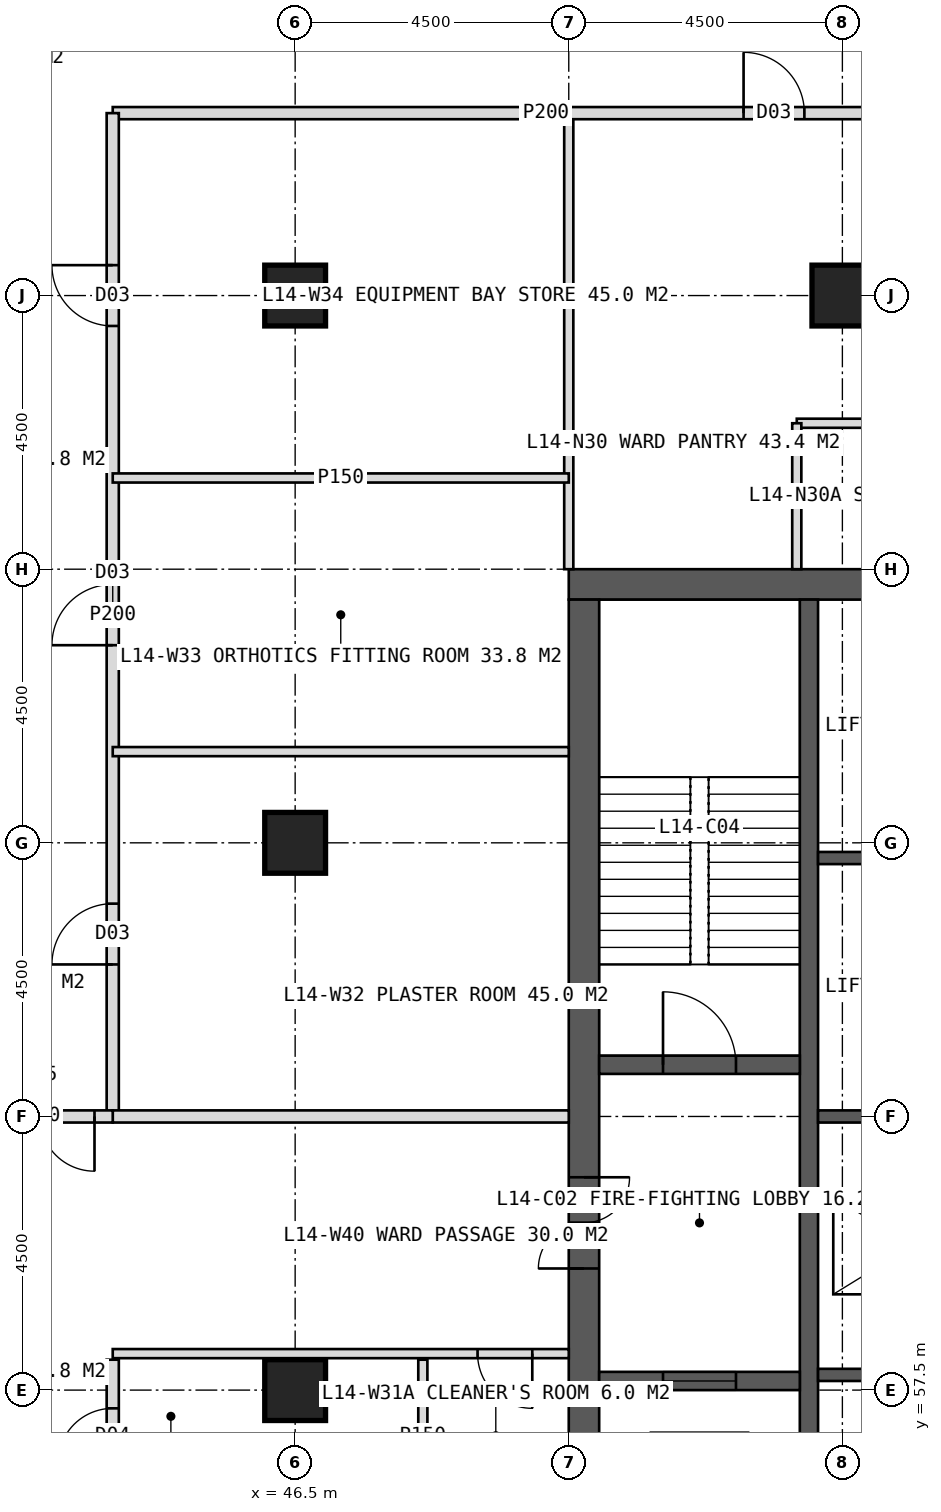
"""IFC4 building model, lengths in metres.
Left out: names, types, materials, properties, quantities, classifications, styles, units other than length and angle.
Written with IfcOpenShell. Run it as: python <this file> out.ifc"""

import sys

from ifc_helpers import new_model, si_unit, direction, frame, frame_2d, origin, origin_2d, place, context, subcontext, project, spatial, rectangle, hollow_rectangle, extrude, element, fill, save


model = new_model("IFC4")
c1 = context("Model", 3, precision=1e-05, world=origin(), true_north=direction((0.0, 1.0)))
c2 = subcontext(c1, "Body", "Model", "MODEL_VIEW")
j1 = project(units=[si_unit("LENGTHUNIT", "METRE"), si_unit("PLANEANGLEUNIT", "RADIAN")], contexts=[c1])
p1 = place(None, origin())
s1 = spatial("IfcSite", under=j1, at=p1, CompositionType="ELEMENT")
p2 = place(p1, origin())
s2 = spatial("IfcBuilding", under=s1, at=p2, CompositionType="ELEMENT")
p3 = place(p2, frame((0.0, 0.0, 63.0)))
s3 = spatial("IfcBuildingStorey", under=s2, at=p3, CompositionType="ELEMENT", Elevation=63.0)
p4 = place(p3, frame((51.0, 70.75, 0.0), z_axis=(0.0, 0.0, 1.0), x_axis=(1.0, 0.0, 0.0)))
e1 = element("IfcWall", 1, at=p4, inside=s3, PredefinedType="SHEAR", context=c2, shape_type="SweptSolid", body=[
    extrude(rectangle(XDim=18.0, YDim=0.5, at=frame_2d((9.0, 0.0))), origin(), (0.0, 0.0, 1.0), 4.0),
])
p5 = place(p4, frame((8.1, 0.0, 0.0)))
e2 = element("IfcOpeningElement", 2, at=p5, cuts=e1, PredefinedType="OPENING", context=c2, shape_type="SweptSolid", body=[
    extrude(rectangle(XDim=1.8, YDim=2.2, at=frame_2d((0.9, 1.1))), frame((0.0, 0.26, 0.0), z_axis=(0.0, -1.0, 0.0), x_axis=(1.0, 0.0, 0.0)), (0.0, 0.0, 1.0), 0.52),
])
p6 = place(p3, frame((51.25, 53.5, 0.0), z_axis=(0.0, 0.0, 1.0), x_axis=(0.0, 1.0, 0.0)))
e3 = element("IfcWall", 3, at=p6, inside=s3, PredefinedType="SHEAR", context=c2, shape_type="SweptSolid", body=[
    extrude(rectangle(XDim=17.0, YDim=0.5, at=frame_2d((8.5, 0.0))), origin(), (0.0, 0.0, 1.0), 4.0),
])
p7 = place(p6, frame((6.0, 0.0, 0.0)))
e4 = element("IfcOpeningElement", 4, at=p7, cuts=e3, PredefinedType="OPENING", context=c2, shape_type="SweptSolid", body=[
    extrude(rectangle(XDim=1.5, YDim=2.2, at=frame_2d((0.75, 1.1))), frame((0.0, 0.26, 0.0), z_axis=(0.0, -1.0, 0.0), x_axis=(1.0, 0.0, 0.0)), (0.0, 0.0, 1.0), 0.52),
])
p8 = place(p3, frame((54.95, 53.5, 0.0), z_axis=(0.0, 0.0, 1.0), x_axis=(0.0, 1.0, 0.0)))
e5 = element("IfcWall", 5, at=p8, inside=s3, PredefinedType="SHEAR", context=c2, shape_type="SweptSolid", body=[
    extrude(rectangle(XDim=17.0, YDim=0.3, at=frame_2d((8.5, 0.0))), origin(), (0.0, 0.0, 1.0), 4.0),
])
for number, where, z_axis, x_axis in (
    (6, (55.1, 57.75, 0.0), (0.0, 0.0, 1.0), (1.0, 0.0, 0.0)),
    (7, (55.1, 62.0, 0.0), (0.0, 0.0, 1.0), (1.0, 0.0, 0.0)),
    (8, (55.1, 66.25, 0.0), (0.0, 0.0, 1.0), (1.0, 0.0, 0.0)),
):
    element("IfcWall", number, at=place(p3, frame(where, z_axis=z_axis, x_axis=x_axis)), inside=s3, PredefinedType="SHEAR", context=c2, shape_type="SweptSolid", body=[
        extrude(rectangle(XDim=3.05, YDim=0.2, at=frame_2d((1.525, 0.0))), origin(), (0.0, 0.0, 1.0), 4.0),
    ])
p9 = place(p3, frame((51.5, 62.85, 0.0), z_axis=(0.0, 0.0, 1.0), x_axis=(1.0, 0.0, 0.0)))
e9 = element("IfcWall", 9, at=p9, inside=s3, PredefinedType="SHEAR", context=c2, shape_type="SweptSolid", body=[
    extrude(rectangle(XDim=3.3, YDim=0.3, at=frame_2d((1.65, 0.0))), origin(), (0.0, 0.0, 1.0), 4.0),
])
p10 = place(p9, frame((1.05, 0.0, 0.0)))
e10 = element("IfcOpeningElement", 10, at=p10, cuts=e9, PredefinedType="OPENING", context=c2, shape_type="SweptSolid", body=[
    extrude(rectangle(XDim=1.2, YDim=2.1, at=frame_2d((0.6, 1.05))), frame((0.0, 0.16, 0.0), z_axis=(0.0, -1.0, 0.0), x_axis=(1.0, 0.0, 0.0)), (0.0, 0.0, 1.0), 0.32),
])
p11 = place(p3, frame((51.5, 57.65, 0.0), z_axis=(0.0, 0.0, 1.0), x_axis=(1.0, 0.0, 0.0)))
e11 = element("IfcWall", 11, at=p11, inside=s3, PredefinedType="SHEAR", context=c2, shape_type="SweptSolid", body=[
    extrude(rectangle(XDim=3.3, YDim=0.3, at=frame_2d((1.65, 0.0))), origin(), (0.0, 0.0, 1.0), 4.0),
])
p12 = place(p11, frame((1.05, 0.0, 0.0)))
e12 = element("IfcOpeningElement", 12, at=p12, cuts=e11, PredefinedType="OPENING", context=c2, shape_type="SweptSolid", body=[
    extrude(rectangle(XDim=1.2, YDim=2.2, at=frame_2d((0.6, 1.1))), frame((0.0, 0.16, 0.0), z_axis=(0.0, -1.0, 0.0), x_axis=(1.0, 0.0, 0.0)), (0.0, 0.0, 1.0), 0.32),
])
for number, where, z_axis, x_axis in (
    (13, (46.5, 75.5, 0.0), (0.0, 0.0, 1.0), (1.0, 0.0, 0.0)),
    (14, (55.5, 75.5, 0.0), (0.0, 0.0, 1.0), (1.0, 0.0, 0.0)),
    (15, (46.5, 57.5, 0.0), (0.0, 0.0, 1.0), (1.0, 0.0, 0.0)),
    (16, (46.5, 66.5, 0.0), (0.0, 0.0, 1.0), (1.0, 0.0, 0.0)),
):
    element("IfcColumn", number, at=place(p3, frame(where, z_axis=z_axis, x_axis=x_axis)), inside=s3, PredefinedType="COLUMN", context=c2, shape_type="SweptSolid", body=[
        extrude(hollow_rectangle(XDim=1.0, YDim=1.0, WallThickness=0.1, at=origin_2d()), origin(), (0.0, 0.0, 1.0), 4.0),
    ])
p13 = place(p3, frame((51.0, 71.0, 0.0), z_axis=(0.0, 0.0, 1.0), x_axis=(0.0, 1.0, 0.0)))
e17 = element("IfcWall", 17, at=p13, inside=s3, PredefinedType="PARTITIONING", context=c2, shape_type="SweptSolid", body=[
    extrude(rectangle(XDim=7.5, YDim=0.15, at=frame_2d((3.75, 0.0))), origin(), (0.0, 0.0, 1.0), 3.75),
])
p14 = place(p3, frame((43.5, 78.5, 0.0), z_axis=(0.0, 0.0, 1.0), x_axis=(1.0, 0.0, 0.0)))
e18 = element("IfcWall", 18, at=p14, inside=s3, PredefinedType="PARTITIONING", context=c2, shape_type="SweptSolid", body=[
    extrude(rectangle(XDim=14.25, YDim=0.2, at=frame_2d((7.125, 0.0))), origin(), (0.0, 0.0, 1.0), 3.75),
])
p15 = place(p14, frame((10.375, 0.0, 0.0)))
e19 = element("IfcOpeningElement", 19, at=p15, cuts=e18, PredefinedType="OPENING", context=c2, shape_type="SweptSolid", body=[
    extrude(rectangle(XDim=1.0, YDim=2.1, at=frame_2d((0.5, 1.05))), frame((0.0, 0.11, 0.0), z_axis=(0.0, -1.0, 0.0), x_axis=(1.0, 0.0, 0.0)), (0.0, 0.0, 1.0), 0.22),
])
p16 = place(p3, frame((54.75, 73.4, 0.0), z_axis=(0.0, 0.0, 1.0), x_axis=(1.0, 0.0, 0.0)))
e20 = element("IfcWall", 20, at=p16, inside=s3, PredefinedType="PARTITIONING", context=c2, shape_type="SweptSolid", body=[
    extrude(rectangle(XDim=3.0, YDim=0.15, at=frame_2d((1.5, 0.0))), origin(), (0.0, 0.0, 1.0), 3.75),
])
p17 = place(p3, frame((54.75, 71.0, 0.0), z_axis=(0.0, 0.0, 1.0), x_axis=(0.0, 1.0, 0.0)))
e21 = element("IfcWall", 21, at=p17, inside=s3, PredefinedType="PARTITIONING", context=c2, shape_type="SweptSolid", body=[
    extrude(rectangle(XDim=2.4, YDim=0.15, at=frame_2d((1.2, 0.0))), origin(), (0.0, 0.0, 1.0), 3.75),
])
p18 = place(p3, frame((43.5, 45.5, 0.0), z_axis=(0.0, 0.0, 1.0), x_axis=(0.0, 1.0, 0.0)))
e22 = element("IfcWall", 22, at=p18, inside=s3, PredefinedType="PARTITIONING", context=c2, shape_type="SweptSolid", body=[
    extrude(rectangle(XDim=12.5, YDim=0.2, at=frame_2d((6.25, 0.0))), origin(), (0.0, 0.0, 1.0), 3.75),
])
p19 = place(p18, frame((8.3, 0.0, 0.0)))
e23 = element("IfcOpeningElement", 23, at=p19, cuts=e22, PredefinedType="OPENING", context=c2, shape_type="SweptSolid", body=[
    extrude(rectangle(XDim=0.9, YDim=2.1, at=frame_2d((0.45, 1.05))), frame((0.0, 0.11, 0.0), z_axis=(0.0, -1.0, 0.0), x_axis=(1.0, 0.0, 0.0)), (0.0, 0.0, 1.0), 0.22),
])
p20 = place(p18, frame((10.8, 0.0, 0.0)))
e24 = element("IfcOpeningElement", 24, at=p20, cuts=e22, PredefinedType="OPENING", context=c2, shape_type="SweptSolid", body=[
    extrude(rectangle(XDim=0.9, YDim=2.1, at=frame_2d((0.45, 1.05))), frame((0.0, 0.11, 0.0), z_axis=(0.0, -1.0, 0.0), x_axis=(1.0, 0.0, 0.0)), (0.0, 0.0, 1.0), 0.22),
])
p21 = place(p3, frame((43.5, 62.0, 0.0), z_axis=(0.0, 0.0, 1.0), x_axis=(0.0, 1.0, 0.0)))
e25 = element("IfcWall", 25, at=p21, inside=s3, PredefinedType="PARTITIONING", context=c2, shape_type="SweptSolid", body=[
    extrude(rectangle(XDim=16.5, YDim=0.2, at=frame_2d((8.25, 0.0))), origin(), (0.0, 0.0, 1.0), 3.75),
])
p22 = place(p21, frame((2.5, 0.0, 0.0)))
e26 = element("IfcOpeningElement", 26, at=p22, cuts=e25, PredefinedType="OPENING", context=c2, shape_type="SweptSolid", body=[
    extrude(rectangle(XDim=1.0, YDim=2.1, at=frame_2d((0.5, 1.05))), frame((0.0, 0.11, 0.0), z_axis=(0.0, -1.0, 0.0), x_axis=(1.0, 0.0, 0.0)), (0.0, 0.0, 1.0), 0.22),
])
p23 = place(p21, frame((7.75, 0.0, 0.0)))
e27 = element("IfcOpeningElement", 27, at=p23, cuts=e25, PredefinedType="OPENING", context=c2, shape_type="SweptSolid", body=[
    extrude(rectangle(XDim=1.0, YDim=2.1, at=frame_2d((0.5, 1.05))), frame((0.0, 0.11, 0.0), z_axis=(0.0, -1.0, 0.0), x_axis=(1.0, 0.0, 0.0)), (0.0, 0.0, 1.0), 0.22),
])
p24 = place(p21, frame((13.0, 0.0, 0.0)))
e28 = element("IfcOpeningElement", 28, at=p24, cuts=e25, PredefinedType="OPENING", context=c2, shape_type="SweptSolid", body=[
    extrude(rectangle(XDim=1.0, YDim=2.1, at=frame_2d((0.5, 1.05))), frame((0.0, 0.11, 0.0), z_axis=(0.0, -1.0, 0.0), x_axis=(1.0, 0.0, 0.0)), (0.0, 0.0, 1.0), 0.22),
])
p25 = place(p3, frame((51.0, 58.1, 0.0), z_axis=(0.0, 0.0, 1.0), x_axis=(-1.0, 0.0, 0.0)))
e29 = element("IfcWall", 29, at=p25, inside=s3, PredefinedType="PARTITIONING", context=c2, shape_type="SweptSolid", body=[
    extrude(rectangle(XDim=7.5, YDim=0.15, at=frame_2d((3.75, 0.0))), origin(), (0.0, 0.0, 1.0), 3.75),
])
p26 = place(p25, frame((0.6, 0.0, 0.0)))
e30 = element("IfcOpeningElement", 30, at=p26, cuts=e29, PredefinedType="OPENING", context=c2, shape_type="SweptSolid", body=[
    extrude(rectangle(XDim=0.9, YDim=2.1, at=frame_2d((0.45, 1.05))), frame((0.0, 0.085, 0.0), z_axis=(0.0, -1.0, 0.0), x_axis=(1.0, 0.0, 0.0)), (0.0, 0.0, 1.0), 0.17),
])
p27 = place(p3, frame((51.0, 62.0, 0.0), z_axis=(0.0, 0.0, 1.0), x_axis=(-1.0, 0.0, 0.0)))
e31 = element("IfcWall", 31, at=p27, inside=s3, PredefinedType="SOLIDWALL", context=c2, shape_type="SweptSolid", body=[
    extrude(rectangle(XDim=7.5, YDim=0.2, at=frame_2d((3.75, 0.0))), origin(), (0.0, 0.0, 1.0), 2.75),
])
for number, where, z_axis, x_axis in (
    (32, (51.0, 68.0, 0.0), (0.0, 0.0, 1.0), (-1.0, 0.0, 0.0)),
    (33, (51.0, 72.5, 0.0), (0.0, 0.0, 1.0), (-1.0, 0.0, 0.0)),
):
    element("IfcWall", number, at=place(p3, frame(where, z_axis=z_axis, x_axis=x_axis)), inside=s3, PredefinedType="PARTITIONING", context=c2, shape_type="SweptSolid", body=[
        extrude(rectangle(XDim=7.5, YDim=0.15, at=frame_2d((3.75, 0.0))), origin(), (0.0, 0.0, 1.0), 3.75),
    ])
p28 = place(p3, frame((48.6, 55.5, 0.0), z_axis=(0.0, 0.0, 1.0), x_axis=(0.0, 1.0, 0.0)))
e34 = element("IfcWall", 34, at=p28, inside=s3, PredefinedType="PARTITIONING", context=c2, shape_type="SweptSolid", body=[
    extrude(rectangle(XDim=2.5, YDim=0.15, at=frame_2d((1.25, 0.0))), origin(), (0.0, 0.0, 1.0), 3.75),
])
p29 = place(p3, frame((43.5, 62.0, 0.0), z_axis=(0.0, 0.0, 1.0), x_axis=(-1.0, 0.0, 0.0)))
e35 = element("IfcWall", 35, at=p29, inside=s3, PredefinedType="SOLIDWALL", context=c2, shape_type="SweptSolid", body=[
    extrude(rectangle(XDim=2.7, YDim=0.2, at=frame_2d((1.35, 0.0))), origin(), (0.0, 0.0, 1.0), 2.75),
])
p30 = place(p29, frame((0.3, 0.0, 0.0)))
e36 = element("IfcOpeningElement", 36, at=p30, cuts=e35, PredefinedType="OPENING", context=c2, shape_type="SweptSolid", body=[
    extrude(rectangle(XDim=1.8, YDim=2.2, at=frame_2d((0.9, 1.1))), frame((0.0, 0.11, 0.0), z_axis=(0.0, -1.0, 0.0), x_axis=(1.0, 0.0, 0.0)), (0.0, 0.0, 1.0), 0.22),
])
p31 = place(p15, origin())
e37 = element("IfcDoor", 37, at=p31, inside=s3, OperationType="SINGLE_SWING_LEFT", PredefinedType="DOOR", context=c2, shape_type="SweptSolid", body=[
    extrude(rectangle(XDim=1.0, YDim=2.1, at=frame_2d((0.5, 1.05))), frame((0.0, 0.025, 0.0), z_axis=(0.0, -1.0, 0.0), x_axis=(1.0, 0.0, 0.0)), (0.0, 0.0, 1.0), 0.05),
])
fill(e19, e37)
p32 = place(p26, origin())
e38 = element("IfcDoor", 38, at=p32, inside=s3, OperationType="SINGLE_SWING_LEFT", PredefinedType="DOOR", context=c2, shape_type="SweptSolid", body=[
    extrude(rectangle(XDim=0.9, YDim=2.1, at=frame_2d((0.45, 1.05))), frame((0.0, 0.025, 0.0), z_axis=(0.0, -1.0, 0.0), x_axis=(1.0, 0.0, 0.0)), (0.0, 0.0, 1.0), 0.05),
])
fill(e30, e38)
p33 = place(p20, origin())
e39 = element("IfcDoor", 39, at=p33, inside=s3, OperationType="SINGLE_SWING_LEFT", PredefinedType="DOOR", context=c2, shape_type="SweptSolid", body=[
    extrude(rectangle(XDim=0.9, YDim=2.1, at=frame_2d((0.45, 1.05))), frame((0.0, 0.025, 0.0), z_axis=(0.0, -1.0, 0.0), x_axis=(1.0, 0.0, 0.0)), (0.0, 0.0, 1.0), 0.05),
])
fill(e24, e39)
p34 = place(p22, origin())
e40 = element("IfcDoor", 40, at=p34, inside=s3, OperationType="SINGLE_SWING_LEFT", PredefinedType="DOOR", context=c2, shape_type="SweptSolid", body=[
    extrude(rectangle(XDim=1.0, YDim=2.1, at=frame_2d((0.5, 1.05))), frame((0.0, 0.025, 0.0), z_axis=(0.0, -1.0, 0.0), x_axis=(1.0, 0.0, 0.0)), (0.0, 0.0, 1.0), 0.05),
])
fill(e26, e40)
p35 = place(p23, origin())
e41 = element("IfcDoor", 41, at=p35, inside=s3, OperationType="SINGLE_SWING_LEFT", PredefinedType="DOOR", context=c2, shape_type="SweptSolid", body=[
    extrude(rectangle(XDim=1.0, YDim=2.1, at=frame_2d((0.5, 1.05))), frame((0.0, 0.025, 0.0), z_axis=(0.0, -1.0, 0.0), x_axis=(1.0, 0.0, 0.0)), (0.0, 0.0, 1.0), 0.05),
])
fill(e27, e41)
p36 = place(p24, origin())
e42 = element("IfcDoor", 42, at=p36, inside=s3, OperationType="SINGLE_SWING_RIGHT", PredefinedType="DOOR", context=c2, shape_type="SweptSolid", body=[
    extrude(rectangle(XDim=1.0, YDim=2.1, at=frame_2d((0.5, 1.05))), frame((0.0, 0.025, 0.0), z_axis=(0.0, -1.0, 0.0), x_axis=(1.0, 0.0, 0.0)), (0.0, 0.0, 1.0), 0.05),
])
fill(e28, e42)
p37 = place(p30, origin())
e43 = element("IfcDoor", 43, at=p37, inside=s3, OperationType="DOUBLE_DOOR_DOUBLE_SWING", PredefinedType="DOOR", context=c2, shape_type="SweptSolid", body=[
    extrude(rectangle(XDim=1.8, YDim=2.2, at=frame_2d((0.9, 1.1))), frame((0.0, 0.025, 0.0), z_axis=(0.0, -1.0, 0.0), x_axis=(1.0, 0.0, 0.0)), (0.0, 0.0, 1.0), 0.05),
])
fill(e36, e43)
p38 = place(p7, origin())
e44 = element("IfcDoor", 44, at=p38, inside=s3, OperationType="DOUBLE_DOOR_SINGLE_SWING", PredefinedType="DOOR", context=c2, shape_type="SweptSolid", body=[
    extrude(rectangle(XDim=1.5, YDim=2.2, at=frame_2d((0.75, 1.1))), frame((0.0, 0.025, 0.0), z_axis=(0.0, -1.0, 0.0), x_axis=(1.0, 0.0, 0.0)), (0.0, 0.0, 1.0), 0.05),
])
fill(e4, e44)
p39 = place(p10, origin())
e45 = element("IfcDoor", 45, at=p39, inside=s3, OperationType="SINGLE_SWING_LEFT", PredefinedType="DOOR", context=c2, shape_type="SweptSolid", body=[
    extrude(rectangle(XDim=1.2, YDim=2.1, at=frame_2d((0.6, 1.05))), frame((0.0, 0.025, 0.0), z_axis=(0.0, -1.0, 0.0), x_axis=(1.0, 0.0, 0.0)), (0.0, 0.0, 1.0), 0.05),
])
fill(e10, e45)
p40 = place(p12, origin())
e46 = element("IfcDoor", 46, at=p40, inside=s3, OperationType="SLIDING_TO_LEFT", PredefinedType="DOOR", context=c2, shape_type="SweptSolid", body=[
    extrude(rectangle(XDim=1.2, YDim=2.2, at=frame_2d((0.6, 1.1))), frame((0.0, 0.025, 0.0), z_axis=(0.0, -1.0, 0.0), x_axis=(1.0, 0.0, 0.0)), (0.0, 0.0, 1.0), 0.05),
])
fill(e12, e46)
save(model, sys.argv[1])
